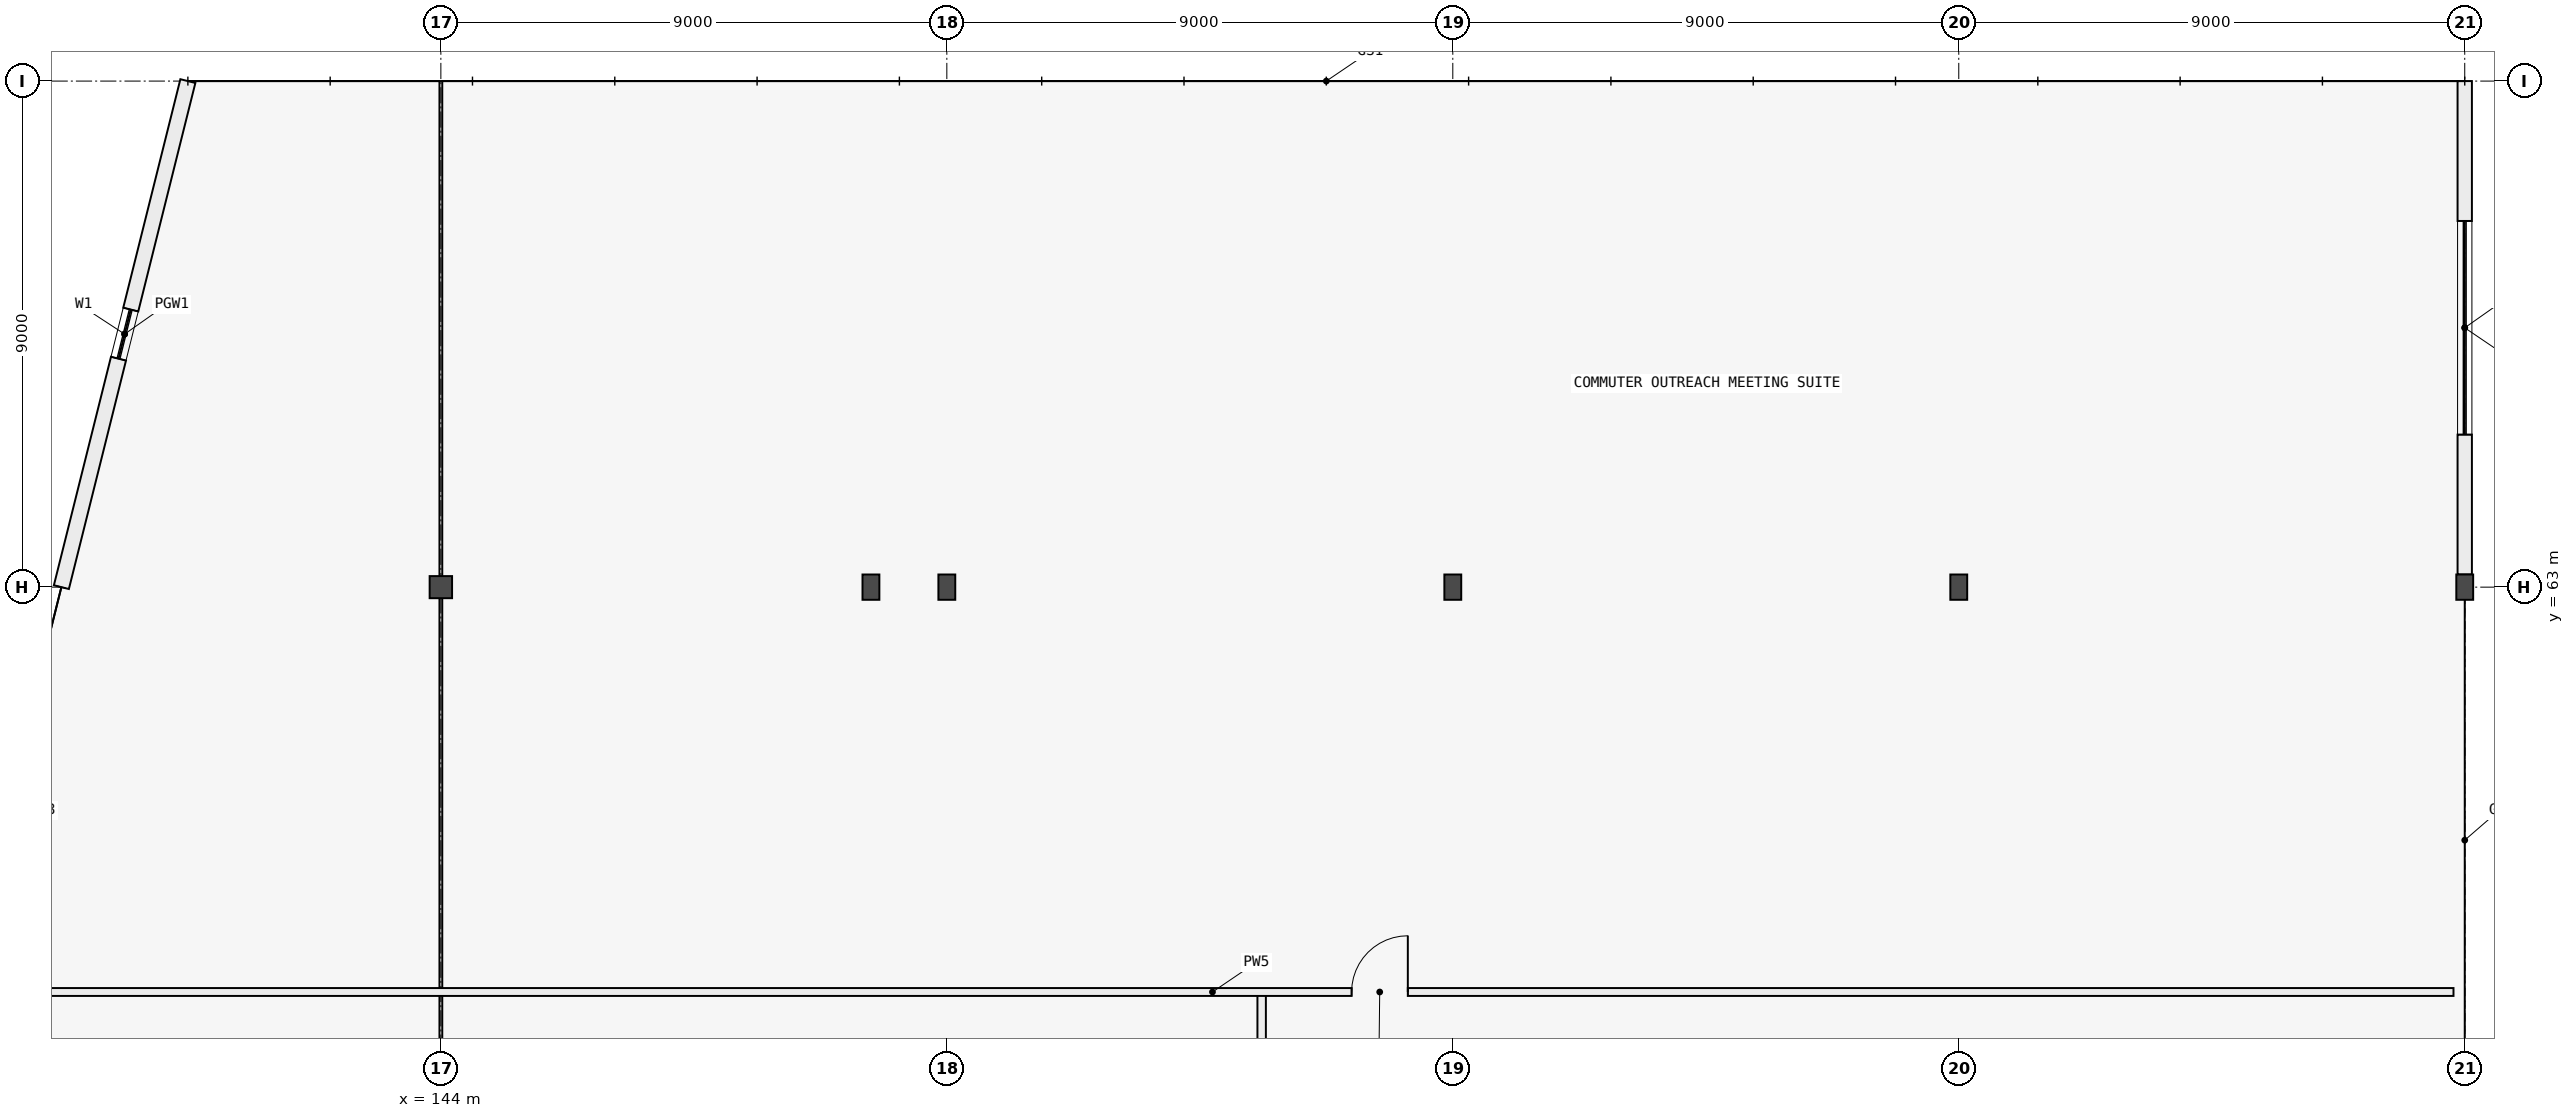
"""IFC4 building model, lengths in metres.
Left out: names, types, materials, properties, quantities, classifications, styles, units other than length and angle.
Written with IfcOpenShell. Run it as: python <this file> out.ifc"""

import sys

from ifc_helpers import new_model, si_unit, direction, frame, frame_2d, origin, origin_2d, place, context, subcontext, project, spatial, rectangle, i_section, extrude, element, fill, save


model = new_model("IFC4")
c1 = context("Model", 3, precision=1e-05, world=origin(), true_north=direction((0.0, 1.0)))
c2 = subcontext(c1, "Body", "Model", "MODEL_VIEW")
j1 = project(units=[si_unit("LENGTHUNIT", "METRE"), si_unit("PLANEANGLEUNIT", "RADIAN")], contexts=[c1])
p1 = place(None, origin())
s1 = spatial("IfcSite", under=j1, at=p1, CompositionType="ELEMENT")
p2 = place(p1, origin())
s2 = spatial("IfcBuilding", under=s1, at=p2, CompositionType="ELEMENT")
p3 = place(p2, frame((0.0, 0.0, 16.8)))
s3 = spatial("IfcBuildingStorey", under=s2, at=p3, CompositionType="ELEMENT", Elevation=16.8)
p4 = place(p3, frame((144.0, 63.0, 0.0), z_axis=(0.0, 0.0, 1.0), x_axis=(1.0, 0.0, 0.0)))
e1 = element("IfcColumn", 1, at=p4, inside=s3, PredefinedType="COLUMN", context=c2, shape_type="SweptSolid", body=[
    extrude(i_section(OverallWidth=0.399, OverallDepth=0.393, WebThickness=0.018, FlangeThickness=0.028, FilletRadius=0.015, at=origin_2d()), origin(), (0.0, 0.0, 1.0), 4.2),
])
for number, where, z_axis, x_axis in (
    (2, (151.65, 63.0, 0.0), (0.0, 0.0, 1.0), (1.0, 0.0, 0.0)),
    (3, (153.0, 63.0, 0.0), (0.0, 0.0, 1.0), (1.0, 0.0, 0.0)),
    (4, (162.0, 63.0, 0.0), (0.0, 0.0, 1.0), (1.0, 0.0, 0.0)),
    (5, (171.0, 63.0, 0.0), (0.0, 0.0, 1.0), (1.0, 0.0, 0.0)),
    (6, (180.0, 63.0, 0.0), (0.0, 0.0, 1.0), (1.0, 0.0, 0.0)),
):
    element("IfcColumn", number, at=place(p3, frame(where, z_axis=z_axis, x_axis=x_axis)), inside=s3, PredefinedType="COLUMN", context=c2, shape_type="SweptSolid", body=[
        extrude(i_section(OverallWidth=0.3, OverallDepth=0.45, WebThickness=0.014, FlangeThickness=0.026, FilletRadius=0.027, at=origin_2d()), origin(), (0.0, 0.0, 1.0), 4.2),
    ])
p5 = place(p3, frame((180.0, 63.225, 0.0), z_axis=(0.0, 0.0, 1.0), x_axis=(0.0, 1.0, 0.0)))
e7 = element("IfcWall", 7, at=p5, inside=s3, PredefinedType="POLYGONAL", context=c2, shape_type="SweptSolid", body=[
    extrude(rectangle(XDim=8.775, YDim=0.255, at=frame_2d((4.387, 0.0))), origin(), (0.0, 0.0, 1.0), 3.955),
])
p6 = place(p5, frame((2.488, 0.0, 0.95)))
e8 = element("IfcOpeningElement", 8, at=p6, cuts=e7, PredefinedType="OPENING", context=c2, shape_type="SweptSolid", body=[
    extrude(rectangle(XDim=3.8, YDim=1.4, at=frame_2d((1.9, 0.7))), frame((0.0, 0.137, 0.0), z_axis=(0.0, -1.0, 0.0), x_axis=(1.0, 0.0, 0.0)), (0.0, 0.0, 1.0), 0.275),
])
p7 = place(p3, frame((137.25, 63.0, 0.0), z_axis=(0.0, 0.0, 1.0), x_axis=(0.242535625036, 0.970142500145, 0.0)))
e9 = element("IfcWall", 9, at=p7, inside=s3, PredefinedType="POLYGONAL", context=c2, shape_type="SweptSolid", body=[
    extrude(rectangle(XDim=9.277, YDim=0.275, at=frame_2d((4.639, 0.0))), origin(), (0.0, 0.0, 1.0), 3.955),
])
p8 = place(p7, frame((4.188, 0.0, 0.95)))
e10 = element("IfcOpeningElement", 10, at=p8, cuts=e9, PredefinedType="OPENING", context=c2, shape_type="SweptSolid", body=[
    extrude(rectangle(XDim=0.9, YDim=1.2, at=frame_2d((0.45, 0.6))), frame((0.0, 0.147, 0.0), z_axis=(0.0, -1.0, 0.0), x_axis=(1.0, 0.0, 0.0)), (0.0, 0.0, 1.0), 0.295),
])
p9 = place(p3, frame((158.6, 36.2, 0.0), z_axis=(0.0, 0.0, 1.0), x_axis=(0.0, 1.0, 0.0)))
e11 = element("IfcWall", 11, at=p9, inside=s3, PredefinedType="PARTITIONING", context=c2, shape_type="SweptSolid", body=[
    extrude(rectangle(XDim=19.6, YDim=0.15, at=frame_2d((9.8, 0.0))), origin(), (0.0, 0.0, 1.0), 3.66),
])
p10 = place(p9, frame((9.2, 0.0, 0.0)))
e12 = element("IfcOpeningElement", 12, at=p10, cuts=e11, PredefinedType="OPENING", context=c2, shape_type="SweptSolid", body=[
    extrude(rectangle(XDim=0.9, YDim=2.1, at=frame_2d((0.45, 1.05))), frame((0.0, 0.085, 0.0), z_axis=(0.0, -1.0, 0.0), x_axis=(1.0, 0.0, 0.0)), (0.0, 0.0, 1.0), 0.17),
])
p11 = place(p3, frame((135.65, 55.8, 0.0), z_axis=(0.0, 0.0, 1.0), x_axis=(1.0, 0.0, 0.0)))
e13 = element("IfcWall", 13, at=p11, inside=s3, PredefinedType="PARTITIONING", context=c2, shape_type="SweptSolid", body=[
    extrude(rectangle(XDim=44.15, YDim=0.14, at=frame_2d((22.075, 0.0))), origin(), (0.0, 0.0, 1.0), 3.955),
])
p12 = place(p11, frame((24.55, 0.0, 0.0)))
e14 = element("IfcOpeningElement", 14, at=p12, cuts=e13, PredefinedType="OPENING", context=c2, shape_type="SweptSolid", body=[
    extrude(rectangle(XDim=1.0, YDim=2.1, at=frame_2d((0.5, 1.05))), frame((0.0, 0.08, 0.0), z_axis=(0.0, -1.0, 0.0), x_axis=(1.0, 0.0, 0.0)), (0.0, 0.0, 1.0), 0.16),
])
p13 = place(p6, origin())
e15 = element("IfcWindow", 15, at=p13, inside=s3, PartitioningType="SINGLE_PANEL", PredefinedType="WINDOW", context=c2, shape_type="SweptSolid", body=[
    extrude(rectangle(XDim=3.8, YDim=1.4, at=frame_2d((1.9, 0.7))), frame((0.0, 0.03, 0.0), z_axis=(0.0, -1.0, 0.0), x_axis=(1.0, 0.0, 0.0)), (0.0, 0.0, 1.0), 0.06),
])
fill(e8, e15)
p14 = place(p8, origin())
e16 = element("IfcWindow", 16, at=p14, inside=s3, PartitioningType="SINGLE_PANEL", PredefinedType="WINDOW", context=c2, shape_type="SweptSolid", body=[
    extrude(rectangle(XDim=0.9, YDim=1.2, at=frame_2d((0.45, 0.6))), frame((0.0, 0.03, 0.0), z_axis=(0.0, -1.0, 0.0), x_axis=(1.0, 0.0, 0.0)), (0.0, 0.0, 1.0), 0.06),
])
fill(e10, e16)
p15 = place(p12, origin())
e17 = element("IfcDoor", 17, at=p15, inside=s3, OperationType="SINGLE_SWING_RIGHT", PredefinedType="DOOR", context=c2, shape_type="SweptSolid", body=[
    extrude(rectangle(XDim=1.0, YDim=2.1, at=frame_2d((0.5, 1.05))), frame((0.0, 0.025, 0.0), z_axis=(0.0, -1.0, 0.0), x_axis=(1.0, 0.0, 0.0)), (0.0, 0.0, 1.0), 0.05),
])
fill(e14, e17)
save(model, sys.argv[1])
